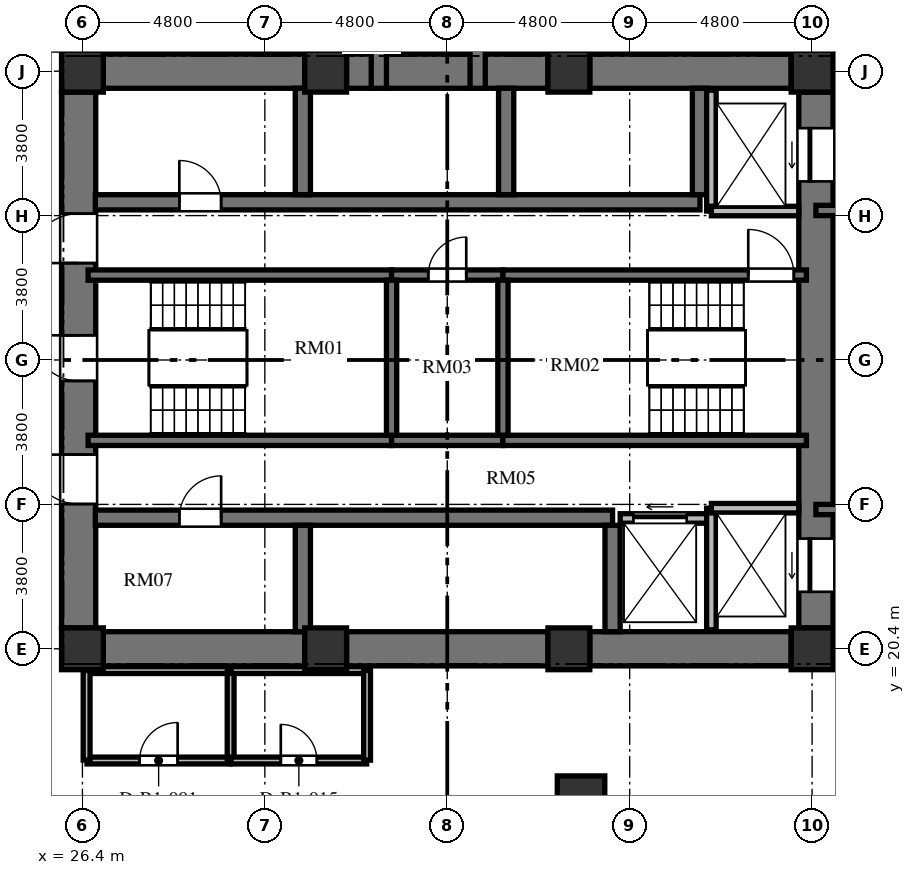
"""IFC4 building model, lengths in metres.
Left out: names, types, materials, properties, quantities, classifications, styles, units other than length and angle.
Written with IfcOpenShell. Run it as: python <this file> out.ifc"""

import sys

from ifc_helpers import new_model, si_unit, direction, frame, frame_2d, origin, origin_2d, place, context, subcontext, project, spatial, rectangle, extrude, element, fill, save


model = new_model("IFC4")
c1 = context("Model", 3, precision=1e-05, world=origin(), true_north=direction((0.0, 1.0)))
c2 = subcontext(c1, "Body", "Model", "MODEL_VIEW")
j1 = project(units=[si_unit("LENGTHUNIT", "METRE"), si_unit("PLANEANGLEUNIT", "RADIAN")], contexts=[c1])
p1 = place(None, origin())
s1 = spatial("IfcSite", under=j1, at=p1, CompositionType="ELEMENT")
p2 = place(p1, origin())
s2 = spatial("IfcBuilding", under=s1, at=p2, CompositionType="ELEMENT")
p3 = place(p2, frame((0.0, 0.0, -5.4)))
s3 = spatial("IfcBuildingStorey", under=s2, at=p3, CompositionType="ELEMENT", Elevation=-5.4)
for number, where, z_axis, x_axis in (
    (1, (26.4, 20.4, 0.0), (0.0, 0.0, 1.0), (1.0, 0.0, 0.0)),
    (2, (32.8, 20.4, 0.0), (0.0, 0.0, 1.0), (1.0, 0.0, 0.0)),
    (3, (39.2, 20.4, 0.0), (0.0, 0.0, 1.0), (1.0, 0.0, 0.0)),
    (4, (45.6, 20.4, 0.0), (0.0, 0.0, 1.0), (1.0, 0.0, 0.0)),
    (5, (45.6, 35.6, 0.0), (0.0, 0.0, 1.0), (1.0, 0.0, 0.0)),
    (6, (39.2, 35.6, 0.0), (0.0, 0.0, 1.0), (1.0, 0.0, 0.0)),
    (7, (32.8, 35.6, 0.0), (0.0, 0.0, 1.0), (1.0, 0.0, 0.0)),
    (8, (26.4, 35.6, 0.0), (0.0, 0.0, 1.0), (1.0, 0.0, 0.0)),
):
    element("IfcColumn", number, at=place(p3, frame(where, z_axis=z_axis, x_axis=x_axis)), inside=s3, PredefinedType="COLUMN", context=c2, shape_type="SweptSolid", body=[
        extrude(rectangle(XDim=1.1, YDim=1.1, at=origin_2d()), origin(), (0.0, 0.0, 1.0), 5.4),
    ])
p4 = place(p3, frame((39.52, 16.625, 0.0), z_axis=(0.0, 0.0, 1.0), x_axis=(1.0, 0.0, 0.0)))
e9 = element("IfcColumn", 9, at=p4, inside=s3, PredefinedType="COLUMN", context=c2, shape_type="SweptSolid", body=[
    extrude(rectangle(XDim=1.25, YDim=0.86, at=origin_2d()), origin(), (0.0, 0.0, 1.0), 5.4),
])
p5 = place(p3, frame((26.3, 20.95, 0.0), z_axis=(0.0, 0.0, 1.0), x_axis=(0.0, 1.0, 0.0)))
e10 = element("IfcWall", 10, at=p5, inside=s3, PredefinedType="SHEAR", context=c2, shape_type="SweptSolid", body=[
    extrude(rectangle(XDim=14.1, YDim=0.9, at=frame_2d((7.05, 0.0))), origin(), (0.0, 0.0, 1.0), 5.4),
])
p6 = place(p5, frame((6.5, 0.0, 0.0)))
e11 = element("IfcOpeningElement", 11, at=p6, cuts=e10, PredefinedType="OPENING", context=c2, shape_type="SweptSolid", body=[
    extrude(rectangle(XDim=1.2, YDim=2.15, at=frame_2d((0.6, 1.075))), frame((0.0, 0.46, 0.0), z_axis=(0.0, -1.0, 0.0), x_axis=(1.0, 0.0, 0.0)), (0.0, 0.0, 1.0), 0.92),
])
p7 = place(p5, frame((9.6, 0.0, 0.0)))
e12 = element("IfcOpeningElement", 12, at=p7, cuts=e10, PredefinedType="OPENING", context=c2, shape_type="SweptSolid", body=[
    extrude(rectangle(XDim=1.3, YDim=2.2, at=frame_2d((0.65, 1.1))), frame((0.0, 0.46, 0.0), z_axis=(0.0, -1.0, 0.0), x_axis=(1.0, 0.0, 0.0)), (0.0, 0.0, 1.0), 0.92),
])
p8 = place(p5, frame((3.26, 0.0, 0.0)))
e13 = element("IfcOpeningElement", 13, at=p8, cuts=e10, PredefinedType="OPENING", context=c2, shape_type="SweptSolid", body=[
    extrude(rectangle(XDim=1.3, YDim=2.2, at=frame_2d((0.65, 1.1))), frame((0.0, 0.46, 0.0), z_axis=(0.0, -1.0, 0.0), x_axis=(1.0, 0.0, 0.0)), (0.0, 0.0, 1.0), 0.92),
])
p9 = place(p3, frame((45.7, 20.95, 0.0), z_axis=(0.0, 0.0, 1.0), x_axis=(0.0, 1.0, 0.0)))
e14 = element("IfcWall", 14, at=p9, inside=s3, PredefinedType="SHEAR", context=c2, shape_type="SweptSolid", body=[
    extrude(rectangle(XDim=14.1, YDim=0.9, at=frame_2d((7.05, 0.0))), origin(), (0.0, 0.0, 1.0), 5.4),
])
p10 = place(p9, frame((11.75, 0.0, 0.0)))
e15 = element("IfcOpeningElement", 15, at=p10, cuts=e14, PredefinedType="OPENING", context=c2, shape_type="SweptSolid", body=[
    extrude(rectangle(XDim=1.4, YDim=2.3, at=frame_2d((0.7, 1.15))), frame((0.0, 0.46, 0.0), z_axis=(0.0, -1.0, 0.0), x_axis=(1.0, 0.0, 0.0)), (0.0, 0.0, 1.0), 0.92),
])
p11 = place(p9, frame((0.95, 0.0, 0.0)))
e16 = element("IfcOpeningElement", 16, at=p11, cuts=e14, PredefinedType="OPENING", context=c2, shape_type="SweptSolid", body=[
    extrude(rectangle(XDim=1.4, YDim=2.3, at=frame_2d((0.7, 1.15))), frame((0.0, 0.46, 0.0), z_axis=(0.0, -1.0, 0.0), x_axis=(1.0, 0.0, 0.0)), (0.0, 0.0, 1.0), 0.92),
])
for number, where, z_axis, x_axis in (
    (17, (26.95, 20.4, 0.0), (0.0, 0.0, 1.0), (1.0, 0.0, 0.0)),
    (18, (26.95, 35.6, 0.0), (0.0, 0.0, 1.0), (1.0, 0.0, 0.0)),
):
    element("IfcWall", number, at=place(p3, frame(where, z_axis=z_axis, x_axis=x_axis)), inside=s3, PredefinedType="SHEAR", context=c2, shape_type="SweptSolid", body=[
        extrude(rectangle(XDim=5.3, YDim=0.9, at=frame_2d((2.65, 0.0))), origin(), (0.0, 0.0, 1.0), 5.4),
    ])
for number, where, z_axis, x_axis in (
    (19, (33.35, 20.4, 0.0), (0.0, 0.0, 1.0), (1.0, 0.0, 0.0)),
    (20, (33.35, 35.6, 0.0), (0.0, 0.0, 1.0), (1.0, 0.0, 0.0)),
):
    element("IfcWall", number, at=place(p3, frame(where, z_axis=z_axis, x_axis=x_axis)), inside=s3, PredefinedType="SHEAR", context=c2, shape_type="SweptSolid", body=[
        extrude(rectangle(XDim=5.3, YDim=0.9, at=frame_2d((2.65, 0.0))), origin(), (0.0, 0.0, 1.0), 5.4),
    ])
for number, where, z_axis, x_axis in (
    (21, (39.75, 20.4, 0.0), (0.0, 0.0, 1.0), (1.0, 0.0, 0.0)),
    (22, (39.75, 35.6, 0.0), (0.0, 0.0, 1.0), (1.0, 0.0, 0.0)),
):
    element("IfcWall", number, at=place(p3, frame(where, z_axis=z_axis, x_axis=x_axis)), inside=s3, PredefinedType="SHEAR", context=c2, shape_type="SweptSolid", body=[
        extrude(rectangle(XDim=5.3, YDim=0.9, at=frame_2d((2.65, 0.0))), origin(), (0.0, 0.0, 1.0), 5.4),
    ])
p12 = place(p3, frame((26.74, 32.15, 0.0), z_axis=(0.0, 0.0, 1.0), x_axis=(1.0, 0.0, 0.0)))
e23 = element("IfcWall", 23, at=p12, inside=s3, PredefinedType="SHEAR", context=c2, shape_type="SweptSolid", body=[
    extrude(rectangle(XDim=15.91, YDim=0.4, at=frame_2d((7.955, 0.0))), origin(), (0.0, 0.0, 1.0), 5.4),
])
p13 = place(p12, frame((2.21, 0.0, 0.0)))
e24 = element("IfcOpeningElement", 24, at=p13, cuts=e23, PredefinedType="OPENING", context=c2, shape_type="SweptSolid", body=[
    extrude(rectangle(XDim=1.1, YDim=2.15, at=frame_2d((0.55, 1.075))), frame((0.0, 0.21, 0.0), z_axis=(0.0, -1.0, 0.0), x_axis=(1.0, 0.0, 0.0)), (0.0, 0.0, 1.0), 0.42),
])
p14 = place(p3, frame((26.74, 23.85, 0.0), z_axis=(0.0, 0.0, 1.0), x_axis=(1.0, 0.0, 0.0)))
e25 = element("IfcWall", 25, at=p14, inside=s3, PredefinedType="SHEAR", context=c2, shape_type="SweptSolid", body=[
    extrude(rectangle(XDim=13.61, YDim=0.4, at=frame_2d((6.805, 0.0))), origin(), (0.0, 0.0, 1.0), 5.4),
])
p15 = place(p14, frame((2.21, 0.0, 0.0)))
e26 = element("IfcOpeningElement", 26, at=p15, cuts=e25, PredefinedType="OPENING", context=c2, shape_type="SweptSolid", body=[
    extrude(rectangle(XDim=1.1, YDim=2.15, at=frame_2d((0.55, 1.075))), frame((0.0, 0.21, 0.0), z_axis=(0.0, -1.0, 0.0), x_axis=(1.0, 0.0, 0.0)), (0.0, 0.0, 1.0), 0.42),
])
for number, where, z_axis, x_axis in (
    (27, (32.2, 32.35, 0.0), (0.0, 0.0, 1.0), (0.0, 1.0, 0.0)),
    (28, (37.55, 32.35, 0.0), (0.0, 0.0, 1.0), (0.0, 1.0, 0.0)),
    (29, (42.65, 32.35, 0.0), (0.0, 0.0, 1.0), (0.0, 1.0, 0.0)),
    (30, (32.2, 20.85, 0.0), (0.0, 0.0, 1.0), (0.0, 1.0, 0.0)),
    (31, (40.35, 20.85, 0.0), (0.0, 0.0, 1.0), (0.0, 1.0, 0.0)),
):
    element("IfcWall", number, at=place(p3, frame(where, z_axis=z_axis, x_axis=x_axis)), inside=s3, PredefinedType="SHEAR", context=c2, shape_type="SweptSolid", body=[
        extrude(rectangle(XDim=2.8, YDim=0.4, at=frame_2d((1.4, 0.0))), origin(), (0.0, 0.0, 1.0), 5.4),
    ])
p16 = place(p3, frame((26.55, 30.235, 0.0), z_axis=(0.0, 0.0, 1.0), x_axis=(1.0, 0.0, 0.0)))
e32 = element("IfcWall", 32, at=p16, inside=s3, PredefinedType="SHEAR", context=c2, shape_type="SweptSolid", body=[
    extrude(rectangle(XDim=7.985, YDim=0.27, at=frame_2d((3.992, 0.0))), origin(), (0.0, 0.0, 1.0), 5.4),
])
p17 = place(p3, frame((34.535, 30.235, 0.0), z_axis=(0.0, 0.0, 1.0), x_axis=(1.0, 0.0, 0.0)))
e33 = element("IfcWall", 33, at=p17, inside=s3, PredefinedType="SHEAR", context=c2, shape_type="SweptSolid", body=[
    extrude(rectangle(XDim=2.93, YDim=0.27, at=frame_2d((1.465, 0.0))), origin(), (0.0, 0.0, 1.0), 5.4),
])
p18 = place(p17, frame((0.965, 0.0, 0.0)))
e34 = element("IfcOpeningElement", 34, at=p18, cuts=e33, PredefinedType="OPENING", context=c2, shape_type="SweptSolid", body=[
    extrude(rectangle(XDim=1.0, YDim=2.1, at=frame_2d((0.5, 1.05))), frame((0.0, 0.145, 0.0), z_axis=(0.0, -1.0, 0.0), x_axis=(1.0, 0.0, 0.0)), (0.0, 0.0, 1.0), 0.29),
])
p19 = place(p3, frame((37.465, 30.235, 0.0), z_axis=(0.0, 0.0, 1.0), x_axis=(1.0, 0.0, 0.0)))
e35 = element("IfcWall", 35, at=p19, inside=s3, PredefinedType="SHEAR", context=c2, shape_type="SweptSolid", body=[
    extrude(rectangle(XDim=7.985, YDim=0.27, at=frame_2d((3.992, 0.0))), origin(), (0.0, 0.0, 1.0), 5.4),
])
p20 = place(p19, frame((6.455, 0.0, 0.0)))
e36 = element("IfcOpeningElement", 36, at=p20, cuts=e35, PredefinedType="OPENING", context=c2, shape_type="SweptSolid", body=[
    extrude(rectangle(XDim=1.2, YDim=2.15, at=frame_2d((0.6, 1.075))), frame((0.0, 0.145, 0.0), z_axis=(0.0, -1.0, 0.0), x_axis=(1.0, 0.0, 0.0)), (0.0, 0.0, 1.0), 0.29),
])
p21 = place(p3, frame((26.55, 25.885, 0.0), z_axis=(0.0, 0.0, 1.0), x_axis=(1.0, 0.0, 0.0)))
e37 = element("IfcWall", 37, at=p21, inside=s3, PredefinedType="SHEAR", context=c2, shape_type="SweptSolid", body=[
    extrude(rectangle(XDim=7.985, YDim=0.27, at=frame_2d((3.992, 0.0))), origin(), (0.0, 0.0, 1.0), 5.4),
])
p22 = place(p3, frame((34.535, 25.885, 0.0), z_axis=(0.0, 0.0, 1.0), x_axis=(1.0, 0.0, 0.0)))
e38 = element("IfcWall", 38, at=p22, inside=s3, PredefinedType="SHEAR", context=c2, shape_type="SweptSolid", body=[
    extrude(rectangle(XDim=2.93, YDim=0.27, at=frame_2d((1.465, 0.0))), origin(), (0.0, 0.0, 1.0), 5.4),
])
p23 = place(p3, frame((37.465, 25.885, 0.0), z_axis=(0.0, 0.0, 1.0), x_axis=(1.0, 0.0, 0.0)))
e39 = element("IfcWall", 39, at=p23, inside=s3, PredefinedType="SHEAR", context=c2, shape_type="SweptSolid", body=[
    extrude(rectangle(XDim=7.985, YDim=0.27, at=frame_2d((3.992, 0.0))), origin(), (0.0, 0.0, 1.0), 5.4),
])
for number, where, z_axis, x_axis in (
    (40, (34.535, 26.02, 0.0), (0.0, 0.0, 1.0), (0.0, 1.0, 0.0)),
    (41, (37.465, 26.02, 0.0), (0.0, 0.0, 1.0), (0.0, 1.0, 0.0)),
):
    element("IfcWall", number, at=place(p3, frame(where, z_axis=z_axis, x_axis=x_axis)), inside=s3, PredefinedType="SHEAR", context=c2, shape_type="SweptSolid", body=[
        extrude(rectangle(XDim=4.08, YDim=0.27, at=frame_2d((2.04, 0.0))), origin(), (0.0, 0.0, 1.0), 5.4),
    ])
p24 = place(p3, frame((40.55, 23.83, 0.0), z_axis=(0.0, 0.0, 1.0), x_axis=(1.0, 0.0, 0.0)))
e42 = element("IfcWall", 42, at=p24, inside=s3, PredefinedType="SOLIDWALL", context=c2, shape_type="SweptSolid", body=[
    extrude(rectangle(XDim=2.4, YDim=0.25, at=frame_2d((1.2, 0.0))), origin(), (0.0, 0.0, 1.0), 5.12),
])
p25 = place(p24, frame((0.35, 0.0, 0.0)))
e43 = element("IfcOpeningElement", 43, at=p25, cuts=e42, PredefinedType="OPENING", context=c2, shape_type="SweptSolid", body=[
    extrude(rectangle(XDim=1.4, YDim=2.3, at=frame_2d((0.7, 1.15))), frame((0.0, 0.135, 0.0), z_axis=(0.0, -1.0, 0.0), x_axis=(1.0, 0.0, 0.0)), (0.0, 0.0, 1.0), 0.27),
])
p26 = place(p3, frame((42.95, 31.92, 0.0), z_axis=(0.0, 0.0, 1.0), x_axis=(0.0, 1.0, 0.0)))
e44 = element("IfcWall", 44, at=p26, inside=s3, PredefinedType="SOLIDWALL", context=c2, shape_type="SweptSolid", body=[
    extrude(rectangle(XDim=3.18, YDim=0.25, at=frame_2d((1.59, 0.0))), origin(), (0.0, 0.0, 1.0), 5.12),
])
p27 = place(p3, frame((42.95, 31.92, 0.0), z_axis=(0.0, 0.0, 1.0), x_axis=(1.0, 0.0, 0.0)))
e45 = element("IfcWall", 45, at=p27, inside=s3, PredefinedType="SOLIDWALL", context=c2, shape_type="SweptSolid", body=[
    extrude(rectangle(XDim=2.3, YDim=0.25, at=frame_2d((1.15, 0.0))), origin(), (0.0, 0.0, 1.0), 5.12),
])
p28 = place(p3, frame((42.95, 20.9, 0.0), z_axis=(0.0, 0.0, 1.0), x_axis=(0.0, 1.0, 0.0)))
e46 = element("IfcWall", 46, at=p28, inside=s3, PredefinedType="SOLIDWALL", context=c2, shape_type="SweptSolid", body=[
    extrude(rectangle(XDim=3.2, YDim=0.25, at=frame_2d((1.6, 0.0))), origin(), (0.0, 0.0, 1.0), 5.12),
])
p29 = place(p3, frame((42.95, 24.1, 0.0), z_axis=(0.0, 0.0, 1.0), x_axis=(1.0, 0.0, 0.0)))
e47 = element("IfcWall", 47, at=p29, inside=s3, PredefinedType="SOLIDWALL", context=c2, shape_type="SweptSolid", body=[
    extrude(rectangle(XDim=2.3, YDim=0.25, at=frame_2d((1.15, 0.0))), origin(), (0.0, 0.0, 1.0), 5.12),
])
p30 = place(p3, frame((46.15, 35.98, 0.0), z_axis=(0.0, 0.0, 1.0), x_axis=(1.0, 0.0, 0.0)))
e48 = element("IfcWall", 48, at=p30, inside=s3, PredefinedType="SHEAR", context=c2, shape_type="SweptSolid", body=[
    extrude(rectangle(XDim=4.4, YDim=0.27, at=frame_2d((2.2, 0.0))), origin(), (0.0, 0.0, 1.0), 5.4),
])
for number, where, z_axis, x_axis in (
    (49, (45.7, 31.935, 0.0), (0.0, 0.0, 1.0), (1.0, 0.0, 0.0)),
    (50, (45.7, 24.065, 0.0), (0.0, 0.0, 1.0), (1.0, 0.0, 0.0)),
):
    element("IfcWall", number, at=place(p3, frame(where, z_axis=z_axis, x_axis=x_axis)), inside=s3, PredefinedType="SHEAR", context=c2, shape_type="SweptSolid", body=[
        extrude(rectangle(XDim=4.715, YDim=0.27, at=frame_2d((2.357, 0.0))), origin(), (0.0, 0.0, 1.0), 5.4),
    ])
p31 = place(p3, frame((45.7, 20.02, 0.0), z_axis=(0.0, 0.0, 1.0), x_axis=(1.0, 0.0, 0.0)))
e51 = element("IfcWall", 51, at=p31, inside=s3, PredefinedType="SOLIDWALL", context=c2, shape_type="SweptSolid", body=[
    extrude(rectangle(XDim=4.715, YDim=0.25, at=frame_2d((2.357, 0.0))), origin(), (0.0, 0.0, 1.0), 5.12),
])
p32 = place(p3, frame((26.52, 19.84, 0.0), z_axis=(0.0, 0.0, 1.0), x_axis=(1.0, 0.0, 0.0)))
e52 = element("IfcWall", 52, at=p32, inside=s3, PredefinedType="PARTITIONING", context=c2, shape_type="SweptSolid", body=[
    extrude(rectangle(XDim=3.77, YDim=0.18, at=frame_2d((1.885, 0.0))), origin(), (0.0, 0.0, 1.0), 5.12),
])
p33 = place(p3, frame((26.52, 17.46, 0.0), z_axis=(0.0, 0.0, 1.0), x_axis=(1.0, 0.0, 0.0)))
e53 = element("IfcWall", 53, at=p33, inside=s3, PredefinedType="PARTITIONING", context=c2, shape_type="SweptSolid", body=[
    extrude(rectangle(XDim=3.77, YDim=0.18, at=frame_2d((1.885, 0.0))), origin(), (0.0, 0.0, 1.0), 5.12),
])
p34 = place(p33, frame((1.385, 0.0, 0.0)))
e54 = element("IfcOpeningElement", 54, at=p34, cuts=e53, PredefinedType="OPENING", context=c2, shape_type="SweptSolid", body=[
    extrude(rectangle(XDim=1.0, YDim=2.1, at=frame_2d((0.5, 1.05))), frame((0.0, 0.1, 0.0), z_axis=(0.0, -1.0, 0.0), x_axis=(1.0, 0.0, 0.0)), (0.0, 0.0, 1.0), 0.2),
])
p35 = place(p3, frame((30.3, 17.47, 0.0), z_axis=(0.0, 0.0, 1.0), x_axis=(0.0, 1.0, 0.0)))
e55 = element("IfcWall", 55, at=p35, inside=s3, PredefinedType="PARTITIONING", context=c2, shape_type="SweptSolid", body=[
    extrude(rectangle(XDim=2.36, YDim=0.18, at=frame_2d((1.18, 0.0))), origin(), (0.0, 0.0, 1.0), 5.12),
])
p36 = place(p3, frame((26.51, 17.47, 0.0), z_axis=(0.0, 0.0, 1.0), x_axis=(0.0, 1.0, 0.0)))
e56 = element("IfcWall", 56, at=p36, inside=s3, PredefinedType="PARTITIONING", context=c2, shape_type="SweptSolid", body=[
    extrude(rectangle(XDim=2.36, YDim=0.18, at=frame_2d((1.18, 0.0))), origin(), (0.0, 0.0, 1.0), 4.255),
])
p37 = place(p3, frame((30.31, 19.84, 0.0), z_axis=(0.0, 0.0, 1.0), x_axis=(1.0, 0.0, 0.0)))
e57 = element("IfcWall", 57, at=p37, inside=s3, PredefinedType="PARTITIONING", context=c2, shape_type="SweptSolid", body=[
    extrude(rectangle(XDim=3.57, YDim=0.18, at=frame_2d((1.785, 0.0))), origin(), (0.0, 0.0, 1.0), 5.12),
])
p38 = place(p3, frame((30.31, 17.46, 0.0), z_axis=(0.0, 0.0, 1.0), x_axis=(1.0, 0.0, 0.0)))
e58 = element("IfcWall", 58, at=p38, inside=s3, PredefinedType="PARTITIONING", context=c2, shape_type="SweptSolid", body=[
    extrude(rectangle(XDim=3.57, YDim=0.18, at=frame_2d((1.785, 0.0))), origin(), (0.0, 0.0, 1.0), 5.12),
])
p39 = place(p38, frame((1.31, 0.0, 0.0)))
e59 = element("IfcOpeningElement", 59, at=p39, cuts=e58, PredefinedType="OPENING", context=c2, shape_type="SweptSolid", body=[
    extrude(rectangle(XDim=0.95, YDim=2.1, at=frame_2d((0.475, 1.05))), frame((0.0, 0.1, 0.0), z_axis=(0.0, -1.0, 0.0), x_axis=(1.0, 0.0, 0.0)), (0.0, 0.0, 1.0), 0.2),
])
p40 = place(p3, frame((33.89, 17.47, 0.0), z_axis=(0.0, 0.0, 1.0), x_axis=(0.0, 1.0, 0.0)))
e60 = element("IfcWall", 60, at=p40, inside=s3, PredefinedType="PARTITIONING", context=c2, shape_type="SweptSolid", body=[
    extrude(rectangle(XDim=2.36, YDim=0.18, at=frame_2d((1.18, 0.0))), origin(), (0.0, 0.0, 1.0), 5.12),
])
for number, where, z_axis, x_axis in (
    (61, (34.2, 35.15, 0.0), (0.0, 0.0, 1.0), (0.0, 1.0, 0.0)),
    (62, (36.8, 35.15, 0.0), (0.0, 0.0, 1.0), (0.0, 1.0, 0.0)),
):
    element("IfcWall", number, at=place(p3, frame(where, z_axis=z_axis, x_axis=x_axis)), inside=s3, PredefinedType="SHEAR", context=c2, shape_type="SweptSolid", body=[
        extrude(rectangle(XDim=7.85, YDim=0.4, at=frame_2d((3.925, 0.0))), origin(), (0.0, 0.0, 1.0), 2.4),
    ])
p41 = place(p6, origin())
e63 = element("IfcDoor", 63, at=p41, inside=s3, OperationType="SINGLE_SWING_RIGHT", PredefinedType="DOOR", context=c2, shape_type="SweptSolid", body=[
    extrude(rectangle(XDim=1.2, YDim=2.15, at=frame_2d((0.6, 1.075))), frame((0.0, 0.025, 0.0), z_axis=(0.0, -1.0, 0.0), x_axis=(1.0, 0.0, 0.0)), (0.0, 0.0, 1.0), 0.05),
])
fill(e11, e63)
p42 = place(p20, origin())
e64 = element("IfcDoor", 64, at=p42, inside=s3, OperationType="SINGLE_SWING_LEFT", PredefinedType="DOOR", context=c2, shape_type="SweptSolid", body=[
    extrude(rectangle(XDim=1.2, YDim=2.15, at=frame_2d((0.6, 1.075))), frame((0.0, 0.025, 0.0), z_axis=(0.0, -1.0, 0.0), x_axis=(1.0, 0.0, 0.0)), (0.0, 0.0, 1.0), 0.05),
])
fill(e36, e64)
p43 = place(p18, origin())
e65 = element("IfcDoor", 65, at=p43, inside=s3, OperationType="SINGLE_SWING_RIGHT", PredefinedType="DOOR", context=c2, shape_type="SweptSolid", body=[
    extrude(rectangle(XDim=1.0, YDim=2.1, at=frame_2d((0.5, 1.05))), frame((0.0, 0.025, 0.0), z_axis=(0.0, -1.0, 0.0), x_axis=(1.0, 0.0, 0.0)), (0.0, 0.0, 1.0), 0.05),
])
fill(e34, e65)
p44 = place(p7, origin())
e66 = element("IfcDoor", 66, at=p44, inside=s3, OperationType="SINGLE_SWING_LEFT", PredefinedType="DOOR", context=c2, shape_type="SweptSolid", body=[
    extrude(rectangle(XDim=1.3, YDim=2.2, at=frame_2d((0.65, 1.1))), frame((0.0, 0.025, 0.0), z_axis=(0.0, -1.0, 0.0), x_axis=(1.0, 0.0, 0.0)), (0.0, 0.0, 1.0), 0.05),
])
fill(e12, e66)
p45 = place(p8, origin())
e67 = element("IfcDoor", 67, at=p45, inside=s3, OperationType="SINGLE_SWING_RIGHT", PredefinedType="DOOR", context=c2, shape_type="SweptSolid", body=[
    extrude(rectangle(XDim=1.3, YDim=2.2, at=frame_2d((0.65, 1.1))), frame((0.0, 0.025, 0.0), z_axis=(0.0, -1.0, 0.0), x_axis=(1.0, 0.0, 0.0)), (0.0, 0.0, 1.0), 0.05),
])
fill(e13, e67)
p46 = place(p13, origin())
e68 = element("IfcDoor", 68, at=p46, inside=s3, OperationType="SINGLE_SWING_LEFT", PredefinedType="DOOR", context=c2, shape_type="SweptSolid", body=[
    extrude(rectangle(XDim=1.1, YDim=2.15, at=frame_2d((0.55, 1.075))), frame((0.0, 0.025, 0.0), z_axis=(0.0, -1.0, 0.0), x_axis=(1.0, 0.0, 0.0)), (0.0, 0.0, 1.0), 0.05),
])
fill(e24, e68)
p47 = place(p15, origin())
e69 = element("IfcDoor", 69, at=p47, inside=s3, OperationType="SINGLE_SWING_RIGHT", PredefinedType="DOOR", context=c2, shape_type="SweptSolid", body=[
    extrude(rectangle(XDim=1.1, YDim=2.15, at=frame_2d((0.55, 1.075))), frame((0.0, 0.025, 0.0), z_axis=(0.0, -1.0, 0.0), x_axis=(1.0, 0.0, 0.0)), (0.0, 0.0, 1.0), 0.05),
])
fill(e26, e69)
p48 = place(p10, origin())
e70 = element("IfcDoor", 70, at=p48, inside=s3, OperationType="SLIDING_TO_LEFT", PredefinedType="DOOR", context=c2, shape_type="SweptSolid", body=[
    extrude(rectangle(XDim=1.4, YDim=2.3, at=frame_2d((0.7, 1.15))), frame((0.0, 0.025, 0.0), z_axis=(0.0, -1.0, 0.0), x_axis=(1.0, 0.0, 0.0)), (0.0, 0.0, 1.0), 0.05),
])
fill(e15, e70)
p49 = place(p11, origin())
e71 = element("IfcDoor", 71, at=p49, inside=s3, OperationType="SLIDING_TO_LEFT", PredefinedType="DOOR", context=c2, shape_type="SweptSolid", body=[
    extrude(rectangle(XDim=1.4, YDim=2.3, at=frame_2d((0.7, 1.15))), frame((0.0, 0.025, 0.0), z_axis=(0.0, -1.0, 0.0), x_axis=(1.0, 0.0, 0.0)), (0.0, 0.0, 1.0), 0.05),
])
fill(e16, e71)
p50 = place(p25, origin())
e72 = element("IfcDoor", 72, at=p50, inside=s3, OperationType="SLIDING_TO_LEFT", PredefinedType="DOOR", context=c2, shape_type="SweptSolid", body=[
    extrude(rectangle(XDim=1.4, YDim=2.3, at=frame_2d((0.7, 1.15))), frame((0.0, 0.025, 0.0), z_axis=(0.0, -1.0, 0.0), x_axis=(1.0, 0.0, 0.0)), (0.0, 0.0, 1.0), 0.05),
])
fill(e43, e72)
p51 = place(p34, origin())
e73 = element("IfcDoor", 73, at=p51, inside=s3, OperationType="SINGLE_SWING_RIGHT", PredefinedType="DOOR", context=c2, shape_type="SweptSolid", body=[
    extrude(rectangle(XDim=1.0, YDim=2.1, at=frame_2d((0.5, 1.05))), frame((0.0, 0.025, 0.0), z_axis=(0.0, -1.0, 0.0), x_axis=(1.0, 0.0, 0.0)), (0.0, 0.0, 1.0), 0.05),
])
fill(e54, e73)
p52 = place(p39, origin())
e74 = element("IfcDoor", 74, at=p52, inside=s3, OperationType="SINGLE_SWING_LEFT", PredefinedType="DOOR", context=c2, shape_type="SweptSolid", body=[
    extrude(rectangle(XDim=0.95, YDim=2.1, at=frame_2d((0.475, 1.05))), frame((0.0, 0.025, 0.0), z_axis=(0.0, -1.0, 0.0), x_axis=(1.0, 0.0, 0.0)), (0.0, 0.0, 1.0), 0.05),
])
fill(e59, e74)
save(model, sys.argv[1])
